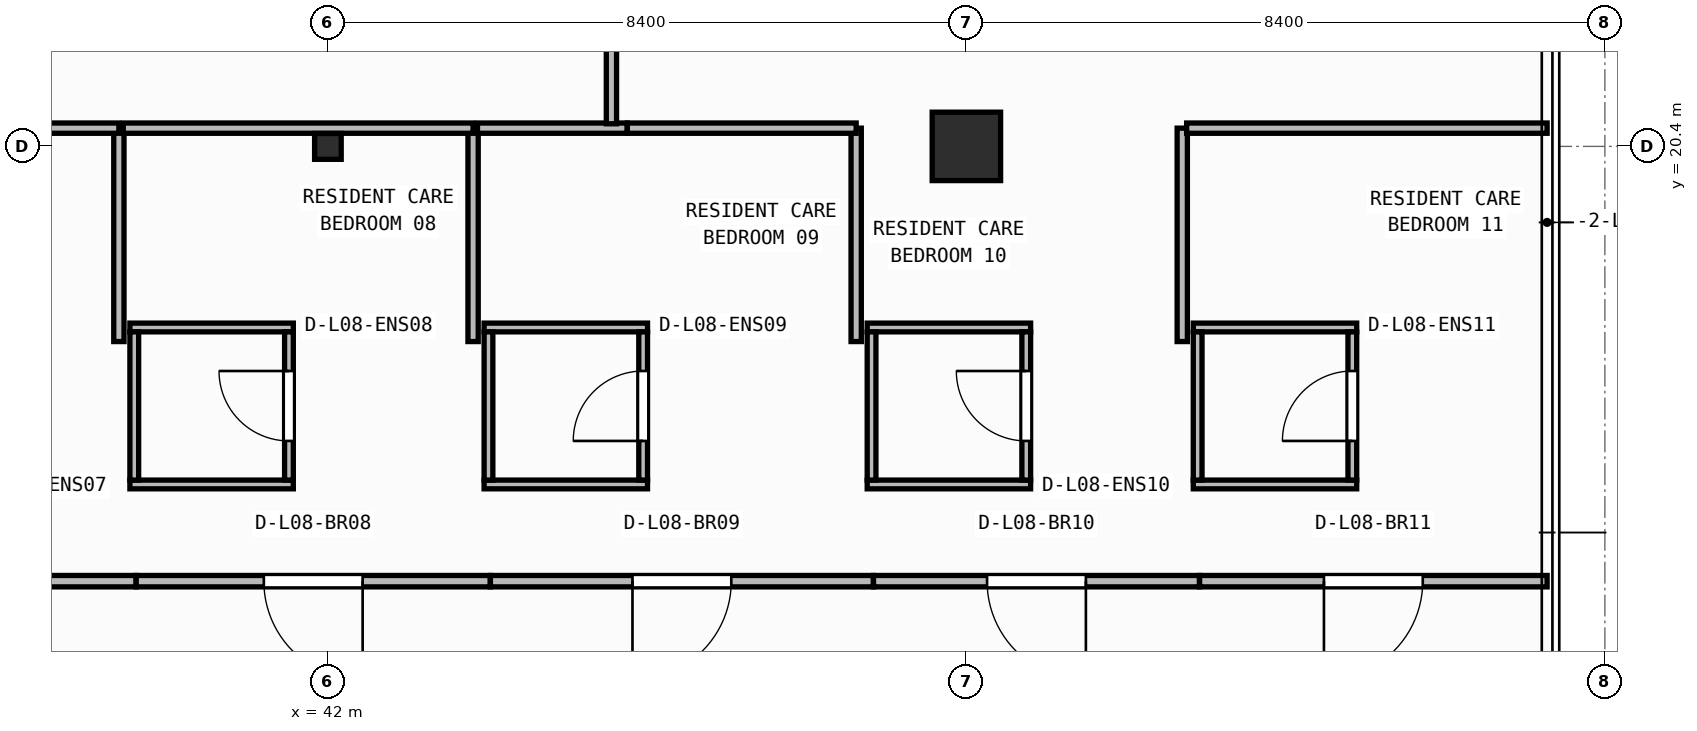
"""IFC4 building model, lengths in metres.
Left out: names, types, materials, properties, quantities, classifications, styles, units other than length and angle.
Written with IfcOpenShell. Run it as: python <this file> out.ifc"""

import sys

from ifc_helpers import new_model, si_unit, direction, frame, frame_2d, origin, origin_2d, place, context, subcontext, project, spatial, rectangle, i_section, extrude, element, fill, save


model = new_model("IFC4")
c1 = context("Model", 3, precision=1e-05, world=origin(), true_north=direction((0.0, 1.0)))
c2 = subcontext(c1, "Body", "Model", "MODEL_VIEW")
j1 = project(units=[si_unit("LENGTHUNIT", "METRE"), si_unit("PLANEANGLEUNIT", "RADIAN")], contexts=[c1])
p1 = place(None, origin())
s1 = spatial("IfcSite", under=j1, at=p1, CompositionType="ELEMENT")
p2 = place(p1, origin())
s2 = spatial("IfcBuilding", under=s1, at=p2, CompositionType="ELEMENT")
p3 = place(p2, frame((0.0, 0.0, 34.35)))
s3 = spatial("IfcBuildingStorey", under=s2, at=p3, CompositionType="ELEMENT", Elevation=34.35)
p4 = place(p3, frame((42.0, 20.4, 0.0), z_axis=(0.0, 0.0, 1.0), x_axis=(1.0, 0.0, 0.0)))
e1 = element("IfcColumn", 1, at=p4, inside=s3, PredefinedType="COLUMN", context=c2, shape_type="SweptSolid", body=[
    extrude(i_section(OverallWidth=0.35, OverallDepth=0.34, WebThickness=0.016, FlangeThickness=0.028, at=origin_2d()), origin(), (0.0, 0.0, 1.0), 3.95),
])
p5 = place(p3, frame((50.4, 20.4, 0.0), z_axis=(0.0, 0.0, 1.0), x_axis=(1.0, 0.0, 0.0)))
e2 = element("IfcColumn", 2, at=p5, inside=s3, PredefinedType="COLUMN", context=c2, shape_type="SweptSolid", body=[
    extrude(rectangle(XDim=0.9, YDim=0.9, at=origin_2d()), origin(), (0.0, 0.0, 1.0), 3.95),
])
p6 = place(p3, frame((39.395, 15.952, 0.0), z_axis=(0.0, 0.0, 1.0), x_axis=(1.0, 0.0, 0.0)))
e3 = element("IfcWall", 3, at=p6, inside=s3, PredefinedType="PARTITIONING", context=c2, shape_type="SweptSolid", body=[
    extrude(rectangle(XDim=2.15, YDim=0.115, at=frame_2d((1.075, 0.0))), origin(), (0.0, 0.0, 1.0), 3.478),
])
p7 = place(p3, frame((39.395, 18.018, 0.0), z_axis=(0.0, 0.0, 1.0), x_axis=(1.0, 0.0, 0.0)))
e4 = element("IfcWall", 4, at=p7, inside=s3, PredefinedType="PARTITIONING", context=c2, shape_type="SweptSolid", body=[
    extrude(rectangle(XDim=2.15, YDim=0.115, at=frame_2d((1.075, 0.0))), origin(), (0.0, 0.0, 1.0), 3.71),
])
p8 = place(p3, frame((39.452, 16.01, 0.0), z_axis=(0.0, 0.0, 1.0), x_axis=(0.0, 1.0, 0.0)))
e5 = element("IfcWall", 5, at=p8, inside=s3, PredefinedType="PARTITIONING", context=c2, shape_type="SweptSolid", body=[
    extrude(rectangle(XDim=1.95, YDim=0.115, at=frame_2d((0.975, 0.0))), origin(), (0.0, 0.0, 1.0), 3.71),
])
p9 = place(p3, frame((41.488, 16.01, 0.0), z_axis=(0.0, 0.0, 1.0), x_axis=(0.0, 1.0, 0.0)))
e6 = element("IfcWall", 6, at=p9, inside=s3, PredefinedType="PARTITIONING", context=c2, shape_type="SweptSolid", body=[
    extrude(rectangle(XDim=1.95, YDim=0.115, at=frame_2d((0.975, 0.0))), origin(), (0.0, 0.0, 1.0), 3.71),
])
p10 = place(p9, frame((0.515, 0.0, 0.0)))
e7 = element("IfcOpeningElement", 7, at=p10, cuts=e6, PredefinedType="OPENING", context=c2, shape_type="SweptSolid", body=[
    extrude(rectangle(XDim=0.92, YDim=2.1, at=frame_2d((0.46, 1.05))), frame((0.0, 0.067, 0.0), z_axis=(0.0, -1.0, 0.0), x_axis=(1.0, 0.0, 0.0)), (0.0, 0.0, 1.0), 0.135),
])
p11 = place(p3, frame((44.055, 15.952, 0.0), z_axis=(0.0, 0.0, 1.0), x_axis=(1.0, 0.0, 0.0)))
e8 = element("IfcWall", 8, at=p11, inside=s3, PredefinedType="PARTITIONING", context=c2, shape_type="SweptSolid", body=[
    extrude(rectangle(XDim=2.15, YDim=0.115, at=frame_2d((1.075, 0.0))), origin(), (0.0, 0.0, 1.0), 3.478),
])
p12 = place(p3, frame((44.055, 18.018, 0.0), z_axis=(0.0, 0.0, 1.0), x_axis=(1.0, 0.0, 0.0)))
e9 = element("IfcWall", 9, at=p12, inside=s3, PredefinedType="PARTITIONING", context=c2, shape_type="SweptSolid", body=[
    extrude(rectangle(XDim=2.15, YDim=0.115, at=frame_2d((1.075, 0.0))), origin(), (0.0, 0.0, 1.0), 3.71),
])
p13 = place(p3, frame((44.113, 16.01, 0.0), z_axis=(0.0, 0.0, 1.0), x_axis=(0.0, 1.0, 0.0)))
e10 = element("IfcWall", 10, at=p13, inside=s3, PredefinedType="PARTITIONING", context=c2, shape_type="SweptSolid", body=[
    extrude(rectangle(XDim=1.95, YDim=0.115, at=frame_2d((0.975, 0.0))), origin(), (0.0, 0.0, 1.0), 3.71),
])
p14 = place(p3, frame((46.147, 16.01, 0.0), z_axis=(0.0, 0.0, 1.0), x_axis=(0.0, 1.0, 0.0)))
e11 = element("IfcWall", 11, at=p14, inside=s3, PredefinedType="PARTITIONING", context=c2, shape_type="SweptSolid", body=[
    extrude(rectangle(XDim=1.95, YDim=0.115, at=frame_2d((0.975, 0.0))), origin(), (0.0, 0.0, 1.0), 3.71),
])
p15 = place(p14, frame((0.515, 0.0, 0.0)))
e12 = element("IfcOpeningElement", 12, at=p15, cuts=e11, PredefinedType="OPENING", context=c2, shape_type="SweptSolid", body=[
    extrude(rectangle(XDim=0.92, YDim=2.1, at=frame_2d((0.46, 1.05))), frame((0.0, 0.067, 0.0), z_axis=(0.0, -1.0, 0.0), x_axis=(1.0, 0.0, 0.0)), (0.0, 0.0, 1.0), 0.135),
])
p16 = place(p3, frame((49.095, 15.952, 0.0), z_axis=(0.0, 0.0, 1.0), x_axis=(1.0, 0.0, 0.0)))
e13 = element("IfcWall", 13, at=p16, inside=s3, PredefinedType="PARTITIONING", context=c2, shape_type="SweptSolid", body=[
    extrude(rectangle(XDim=2.15, YDim=0.115, at=frame_2d((1.075, 0.0))), origin(), (0.0, 0.0, 1.0), 3.478),
])
p17 = place(p3, frame((49.095, 18.018, 0.0), z_axis=(0.0, 0.0, 1.0), x_axis=(1.0, 0.0, 0.0)))
e14 = element("IfcWall", 14, at=p17, inside=s3, PredefinedType="PARTITIONING", context=c2, shape_type="SweptSolid", body=[
    extrude(rectangle(XDim=2.15, YDim=0.115, at=frame_2d((1.075, 0.0))), origin(), (0.0, 0.0, 1.0), 3.71),
])
p18 = place(p3, frame((49.153, 16.01, 0.0), z_axis=(0.0, 0.0, 1.0), x_axis=(0.0, 1.0, 0.0)))
e15 = element("IfcWall", 15, at=p18, inside=s3, PredefinedType="PARTITIONING", context=c2, shape_type="SweptSolid", body=[
    extrude(rectangle(XDim=1.95, YDim=0.115, at=frame_2d((0.975, 0.0))), origin(), (0.0, 0.0, 1.0), 3.71),
])
p19 = place(p3, frame((51.188, 16.01, 0.0), z_axis=(0.0, 0.0, 1.0), x_axis=(0.0, 1.0, 0.0)))
e16 = element("IfcWall", 16, at=p19, inside=s3, PredefinedType="PARTITIONING", context=c2, shape_type="SweptSolid", body=[
    extrude(rectangle(XDim=1.95, YDim=0.115, at=frame_2d((0.975, 0.0))), origin(), (0.0, 0.0, 1.0), 3.71),
])
p20 = place(p19, frame((0.515, 0.0, 0.0)))
e17 = element("IfcOpeningElement", 17, at=p20, cuts=e16, PredefinedType="OPENING", context=c2, shape_type="SweptSolid", body=[
    extrude(rectangle(XDim=0.92, YDim=2.1, at=frame_2d((0.46, 1.05))), frame((0.0, 0.067, 0.0), z_axis=(0.0, -1.0, 0.0), x_axis=(1.0, 0.0, 0.0)), (0.0, 0.0, 1.0), 0.135),
])
for number, where, z_axis, x_axis in (
    (18, (53.385, 15.952, 0.0), (0.0, 0.0, 1.0), (1.0, 0.0, 0.0)),
    (19, (53.385, 18.018, 0.0), (0.0, 0.0, 1.0), (1.0, 0.0, 0.0)),
):
    element("IfcWall", number, at=place(p3, frame(where, z_axis=z_axis, x_axis=x_axis)), inside=s3, PredefinedType="PARTITIONING", context=c2, shape_type="SweptSolid", body=[
        extrude(rectangle(XDim=2.15, YDim=0.115, at=frame_2d((1.075, 0.0))), origin(), (0.0, 0.0, 1.0), 3.71),
    ])
p21 = place(p3, frame((53.442, 16.01, 0.0), z_axis=(0.0, 0.0, 1.0), x_axis=(0.0, 1.0, 0.0)))
e20 = element("IfcWall", 20, at=p21, inside=s3, PredefinedType="PARTITIONING", context=c2, shape_type="SweptSolid", body=[
    extrude(rectangle(XDim=1.95, YDim=0.115, at=frame_2d((0.975, 0.0))), origin(), (0.0, 0.0, 1.0), 3.71),
])
p22 = place(p3, frame((55.478, 16.01, 0.0), z_axis=(0.0, 0.0, 1.0), x_axis=(0.0, 1.0, 0.0)))
e21 = element("IfcWall", 21, at=p22, inside=s3, PredefinedType="PARTITIONING", context=c2, shape_type="SweptSolid", body=[
    extrude(rectangle(XDim=1.95, YDim=0.115, at=frame_2d((0.975, 0.0))), origin(), (0.0, 0.0, 1.0), 3.71),
])
p23 = place(p22, frame((0.515, 0.0, 0.0)))
e22 = element("IfcOpeningElement", 22, at=p23, cuts=e21, PredefinedType="OPENING", context=c2, shape_type="SweptSolid", body=[
    extrude(rectangle(XDim=0.92, YDim=2.1, at=frame_2d((0.46, 1.05))), frame((0.0, 0.067, 0.0), z_axis=(0.0, -1.0, 0.0), x_axis=(1.0, 0.0, 0.0)), (0.0, 0.0, 1.0), 0.135),
])
p24 = place(p3, frame((39.476, 14.68, 0.0), z_axis=(0.0, 0.0, 1.0), x_axis=(-1.0, 0.0, 0.0)))
e23 = element("IfcWall", 23, at=p24, inside=s3, PredefinedType="PARTITIONING", context=c2, shape_type="SweptSolid", body=[
    extrude(rectangle(XDim=4.288, YDim=0.15, at=frame_2d((2.144, 0.0))), origin(), (0.0, 0.0, 1.0), 3.71),
])
p25 = place(p24, frame((1.494, 0.0, 0.0)))
e24 = element("IfcOpeningElement", 24, at=p25, cuts=e23, PredefinedType="OPENING", context=c2, shape_type="SweptSolid", body=[
    extrude(rectangle(XDim=1.3, YDim=2.15, at=frame_2d((0.65, 1.075))), frame((0.0, 0.085, 0.0), z_axis=(0.0, -1.0, 0.0), x_axis=(1.0, 0.0, 0.0)), (0.0, 0.0, 1.0), 0.17),
])
p26 = place(p3, frame((44.136, 14.68, 0.0), z_axis=(0.0, 0.0, 1.0), x_axis=(-1.0, 0.0, 0.0)))
e25 = element("IfcWall", 25, at=p26, inside=s3, PredefinedType="PARTITIONING", context=c2, shape_type="SweptSolid", body=[
    extrude(rectangle(XDim=4.658, YDim=0.15, at=frame_2d((2.329, 0.0))), origin(), (0.0, 0.0, 1.0), 3.71),
])
p27 = place(p26, frame((1.679, 0.0, 0.0)))
e26 = element("IfcOpeningElement", 26, at=p27, cuts=e25, PredefinedType="OPENING", context=c2, shape_type="SweptSolid", body=[
    extrude(rectangle(XDim=1.3, YDim=2.15, at=frame_2d((0.65, 1.075))), frame((0.0, 0.085, 0.0), z_axis=(0.0, -1.0, 0.0), x_axis=(1.0, 0.0, 0.0)), (0.0, 0.0, 1.0), 0.17),
])
p28 = place(p3, frame((49.176, 14.68, 0.0), z_axis=(0.0, 0.0, 1.0), x_axis=(-1.0, 0.0, 0.0)))
e27 = element("IfcWall", 27, at=p28, inside=s3, PredefinedType="PARTITIONING", context=c2, shape_type="SweptSolid", body=[
    extrude(rectangle(XDim=5.038, YDim=0.15, at=frame_2d((2.519, 0.0))), origin(), (0.0, 0.0, 1.0), 3.71),
])
p29 = place(p28, frame((1.869, 0.0, 0.0)))
e28 = element("IfcOpeningElement", 28, at=p29, cuts=e27, PredefinedType="OPENING", context=c2, shape_type="SweptSolid", body=[
    extrude(rectangle(XDim=1.3, YDim=2.15, at=frame_2d((0.65, 1.075))), frame((0.0, 0.085, 0.0), z_axis=(0.0, -1.0, 0.0), x_axis=(1.0, 0.0, 0.0)), (0.0, 0.0, 1.0), 0.17),
])
p30 = place(p3, frame((53.466, 14.68, 0.0), z_axis=(0.0, 0.0, 1.0), x_axis=(-1.0, 0.0, 0.0)))
e29 = element("IfcWall", 29, at=p30, inside=s3, PredefinedType="PARTITIONING", context=c2, shape_type="SweptSolid", body=[
    extrude(rectangle(XDim=4.288, YDim=0.15, at=frame_2d((2.144, 0.0))), origin(), (0.0, 0.0, 1.0), 3.71),
])
p31 = place(p30, frame((1.494, 0.0, 0.0)))
e30 = element("IfcOpeningElement", 30, at=p31, cuts=e29, PredefinedType="OPENING", context=c2, shape_type="SweptSolid", body=[
    extrude(rectangle(XDim=1.3, YDim=2.15, at=frame_2d((0.65, 1.075))), frame((0.0, 0.085, 0.0), z_axis=(0.0, -1.0, 0.0), x_axis=(1.0, 0.0, 0.0)), (0.0, 0.0, 1.0), 0.17),
])
p32 = place(p3, frame((58.04, 14.68, 0.0), z_axis=(0.0, 0.0, 1.0), x_axis=(-1.0, 0.0, 0.0)))
e31 = element("IfcWall", 31, at=p32, inside=s3, PredefinedType="PARTITIONING", context=c2, shape_type="SweptSolid", body=[
    extrude(rectangle(XDim=4.572, YDim=0.15, at=frame_2d((2.286, 0.0))), origin(), (0.0, 0.0, 1.0), 3.71),
])
p33 = place(p32, frame((1.636, 0.0, 0.0)))
e32 = element("IfcOpeningElement", 32, at=p33, cuts=e31, PredefinedType="OPENING", context=c2, shape_type="SweptSolid", body=[
    extrude(rectangle(XDim=1.3, YDim=2.15, at=frame_2d((0.65, 1.075))), frame((0.0, 0.085, 0.0), z_axis=(0.0, -1.0, 0.0), x_axis=(1.0, 0.0, 0.0)), (0.0, 0.0, 1.0), 0.17),
])
p34 = place(p3, frame((39.25, 17.833, 0.0), z_axis=(0.0, 0.0, 1.0), x_axis=(0.0, 1.0, 0.0)))
e33 = element("IfcWall", 33, at=p34, inside=s3, PredefinedType="PARTITIONING", context=c2, shape_type="SweptSolid", body=[
    extrude(rectangle(XDim=2.807, YDim=0.135, at=frame_2d((1.404, 0.0))), origin(), (0.0, 0.0, 1.0), 3.71),
])
p35 = place(p3, frame((39.25, 20.64, 0.0), z_axis=(0.0, 0.0, 1.0), x_axis=(-1.0, 0.0, 0.0)))
e34 = element("IfcWall", 34, at=p35, inside=s3, PredefinedType="PARTITIONING", context=c2, shape_type="SweptSolid", body=[
    extrude(rectangle(XDim=2.72, YDim=0.135, at=frame_2d((1.36, 0.0))), origin(), (0.0, 0.0, 1.0), 3.073),
])
p36 = place(p3, frame((43.91, 17.833, 0.0), z_axis=(0.0, 0.0, 1.0), x_axis=(0.0, 1.0, 0.0)))
e35 = element("IfcWall", 35, at=p36, inside=s3, PredefinedType="PARTITIONING", context=c2, shape_type="SweptSolid", body=[
    extrude(rectangle(XDim=2.807, YDim=0.135, at=frame_2d((1.404, 0.0))), origin(), (0.0, 0.0, 1.0), 3.71),
])
p37 = place(p3, frame((43.91, 20.64, 0.0), z_axis=(0.0, 0.0, 1.0), x_axis=(-1.0, 0.0, 0.0)))
e36 = element("IfcWall", 36, at=p37, inside=s3, PredefinedType="PARTITIONING", context=c2, shape_type="SweptSolid", body=[
    extrude(rectangle(XDim=4.602, YDim=0.135, at=frame_2d((2.301, 0.0))), origin(), (0.0, 0.0, 1.0), 3.073),
])
p38 = place(p3, frame((48.95, 17.833, 0.0), z_axis=(0.0, 0.0, 1.0), x_axis=(0.0, 1.0, 0.0)))
e37 = element("IfcWall", 37, at=p38, inside=s3, PredefinedType="PARTITIONING", context=c2, shape_type="SweptSolid", body=[
    extrude(rectangle(XDim=2.807, YDim=0.135, at=frame_2d((1.404, 0.0))), origin(), (0.0, 0.0, 1.0), 3.71),
])
p39 = place(p3, frame((45.938, 20.64, 0.0), z_axis=(0.0, 0.0, 1.0), x_axis=(-1.0, 0.0, 0.0)))
e38 = element("IfcWall", 38, at=p39, inside=s3, PredefinedType="PARTITIONING", context=c2, shape_type="SweptSolid", body=[
    extrude(rectangle(XDim=1.97, YDim=0.135, at=frame_2d((0.985, 0.0))), origin(), (0.0, 0.0, 1.0), 3.073),
])
p40 = place(p3, frame((48.95, 20.64, 0.0), z_axis=(0.0, 0.0, 1.0), x_axis=(-1.0, 0.0, 0.0)))
e39 = element("IfcWall", 39, at=p40, inside=s3, PredefinedType="PARTITIONING", context=c2, shape_type="SweptSolid", body=[
    extrude(rectangle(XDim=3.01, YDim=0.135, at=frame_2d((1.505, 0.0))), origin(), (0.0, 0.0, 1.0), 3.073),
])
p41 = place(p3, frame((53.24, 17.833, 0.0), z_axis=(0.0, 0.0, 1.0), x_axis=(0.0, 1.0, 0.0)))
e40 = element("IfcWall", 40, at=p41, inside=s3, PredefinedType="PARTITIONING", context=c2, shape_type="SweptSolid", body=[
    extrude(rectangle(XDim=2.807, YDim=0.135, at=frame_2d((1.404, 0.0))), origin(), (0.0, 0.0, 1.0), 3.71),
])
p42 = place(p3, frame((58.04, 20.64, 0.0), z_axis=(0.0, 0.0, 1.0), x_axis=(-1.0, 0.0, 0.0)))
e41 = element("IfcWall", 41, at=p42, inside=s3, PredefinedType="PARTITIONING", context=c2, shape_type="SweptSolid", body=[
    extrude(rectangle(XDim=4.742, YDim=0.135, at=frame_2d((2.371, 0.0))), origin(), (0.0, 0.0, 1.0), 3.71),
])
p43 = place(p3, frame((45.73, 20.698, 0.0), z_axis=(0.0, 0.0, 1.0), x_axis=(0.0, 1.0, 0.0)))
e42 = element("IfcWall", 42, at=p43, inside=s3, PredefinedType="PARTITIONING", context=c2, shape_type="SweptSolid", body=[
    extrude(rectangle(XDim=11.756, YDim=0.135, at=frame_2d((5.878, 0.0))), origin(), (0.0, 0.0, 1.0), 3.71),
])
p44 = place(p43, frame((5.328, 0.0, 0.0)))
e43 = element("IfcOpeningElement", 43, at=p44, cuts=e42, PredefinedType="OPENING", context=c2, shape_type="SweptSolid", body=[
    extrude(rectangle(XDim=1.1, YDim=2.1, at=frame_2d((0.55, 1.05))), frame((0.0, 0.077, 0.0), z_axis=(0.0, -1.0, 0.0), x_axis=(1.0, 0.0, 0.0)), (0.0, 0.0, 1.0), 0.155),
])
p45 = place(p10, origin())
e44 = element("IfcDoor", 44, at=p45, inside=s3, OperationType="SINGLE_SWING_RIGHT", PredefinedType="DOOR", context=c2, shape_type="SweptSolid", body=[
    extrude(rectangle(XDim=0.92, YDim=2.1, at=frame_2d((0.46, 1.05))), frame((0.0, 0.025, 0.0), z_axis=(0.0, -1.0, 0.0), x_axis=(1.0, 0.0, 0.0)), (0.0, 0.0, 1.0), 0.05),
])
fill(e7, e44)
p46 = place(p15, origin())
e45 = element("IfcDoor", 45, at=p46, inside=s3, OperationType="SINGLE_SWING_LEFT", PredefinedType="DOOR", context=c2, shape_type="SweptSolid", body=[
    extrude(rectangle(XDim=0.92, YDim=2.1, at=frame_2d((0.46, 1.05))), frame((0.0, 0.025, 0.0), z_axis=(0.0, -1.0, 0.0), x_axis=(1.0, 0.0, 0.0)), (0.0, 0.0, 1.0), 0.05),
])
fill(e12, e45)
p47 = place(p20, origin())
e46 = element("IfcDoor", 46, at=p47, inside=s3, OperationType="SINGLE_SWING_RIGHT", PredefinedType="DOOR", context=c2, shape_type="SweptSolid", body=[
    extrude(rectangle(XDim=0.92, YDim=2.1, at=frame_2d((0.46, 1.05))), frame((0.0, 0.025, 0.0), z_axis=(0.0, -1.0, 0.0), x_axis=(1.0, 0.0, 0.0)), (0.0, 0.0, 1.0), 0.05),
])
fill(e17, e46)
p48 = place(p23, origin())
e47 = element("IfcDoor", 47, at=p48, inside=s3, OperationType="SINGLE_SWING_LEFT", PredefinedType="DOOR", context=c2, shape_type="SweptSolid", body=[
    extrude(rectangle(XDim=0.92, YDim=2.1, at=frame_2d((0.46, 1.05))), frame((0.0, 0.025, 0.0), z_axis=(0.0, -1.0, 0.0), x_axis=(1.0, 0.0, 0.0)), (0.0, 0.0, 1.0), 0.05),
])
fill(e22, e47)
p49 = place(p27, origin())
e48 = element("IfcDoor", 48, at=p49, inside=s3, OperationType="SINGLE_SWING_LEFT", PredefinedType="DOOR", context=c2, shape_type="SweptSolid", body=[
    extrude(rectangle(XDim=1.3, YDim=2.15, at=frame_2d((0.65, 1.075))), frame((0.0, 0.025, 0.0), z_axis=(0.0, -1.0, 0.0), x_axis=(1.0, 0.0, 0.0)), (0.0, 0.0, 1.0), 0.05),
])
fill(e26, e48)
p50 = place(p29, origin())
e49 = element("IfcDoor", 49, at=p50, inside=s3, OperationType="SINGLE_SWING_RIGHT", PredefinedType="DOOR", context=c2, shape_type="SweptSolid", body=[
    extrude(rectangle(XDim=1.3, YDim=2.15, at=frame_2d((0.65, 1.075))), frame((0.0, 0.025, 0.0), z_axis=(0.0, -1.0, 0.0), x_axis=(1.0, 0.0, 0.0)), (0.0, 0.0, 1.0), 0.05),
])
fill(e28, e49)
p51 = place(p31, origin())
e50 = element("IfcDoor", 50, at=p51, inside=s3, OperationType="SINGLE_SWING_LEFT", PredefinedType="DOOR", context=c2, shape_type="SweptSolid", body=[
    extrude(rectangle(XDim=1.3, YDim=2.15, at=frame_2d((0.65, 1.075))), frame((0.0, 0.025, 0.0), z_axis=(0.0, -1.0, 0.0), x_axis=(1.0, 0.0, 0.0)), (0.0, 0.0, 1.0), 0.05),
])
fill(e30, e50)
p52 = place(p33, origin())
e51 = element("IfcDoor", 51, at=p52, inside=s3, OperationType="SINGLE_SWING_RIGHT", PredefinedType="DOOR", context=c2, shape_type="SweptSolid", body=[
    extrude(rectangle(XDim=1.3, YDim=2.15, at=frame_2d((0.65, 1.075))), frame((0.0, 0.025, 0.0), z_axis=(0.0, -1.0, 0.0), x_axis=(1.0, 0.0, 0.0)), (0.0, 0.0, 1.0), 0.05),
])
fill(e32, e51)
save(model, sys.argv[1])
